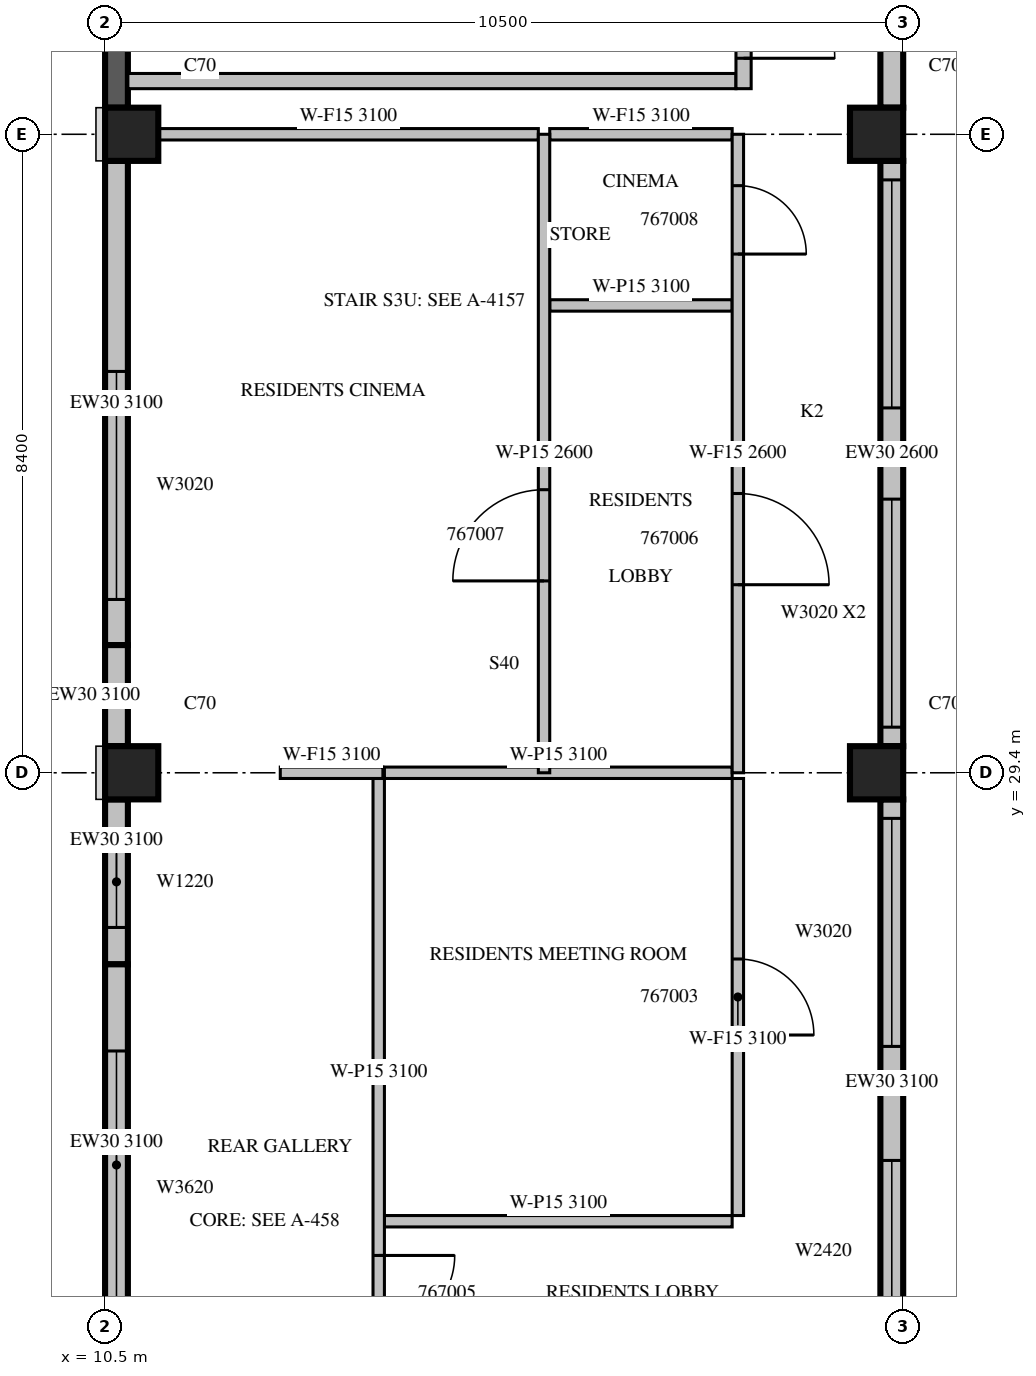
"""IFC4 building model, lengths in metres.
Left out: names, types, materials, properties, quantities, classifications, styles, units other than length and angle.
Written with IfcOpenShell. Run it as: python <this file> out.ifc"""

import sys

from ifc_helpers import new_model, si_unit, direction, frame, frame_2d, origin, origin_2d, place, context, subcontext, project, spatial, rectangle, extrude, source, transform, mapped, element, fill, save


model = new_model("IFC4")
c1 = context("Model", 3, precision=1e-05, world=origin(), true_north=direction((0.0, 1.0)))
c2 = subcontext(c1, "Body", "Model", "MODEL_VIEW")
j1 = project(units=[si_unit("LENGTHUNIT", "METRE"), si_unit("PLANEANGLEUNIT", "RADIAN")], contexts=[c1])
p1 = place(None, origin())
s1 = spatial("IfcSite", under=j1, at=p1, CompositionType="ELEMENT")
p2 = place(p1, origin())
s2 = spatial("IfcBuilding", under=s1, at=p2, CompositionType="ELEMENT")
p3 = place(p2, frame((0.0, 0.0, 295.0)))
s3 = spatial("IfcBuildingStorey", under=s2, at=p3, CompositionType="ELEMENT", Elevation=295.0)
m1 = source(origin(), c2, "Body", "SweptSolid", [
    extrude(rectangle(XDim=0.7, YDim=0.7, at=origin_2d()), origin(), (0.0, 0.0, 1.0), 3.5),
])
for number, where, z_axis, x_axis in (
    (1, (10.85, 29.4, 0.0), (0.0, 0.0, 1.0), (1.0, 0.0, 0.0)),
    (2, (20.65, 29.4, 0.0), (0.0, 0.0, 1.0), (1.0, 0.0, 0.0)),
    (3, (10.85, 37.8, 0.0), (0.0, 0.0, 1.0), (1.0, 0.0, 0.0)),
    (4, (20.65, 37.8, 0.0), (0.0, 0.0, 1.0), (1.0, 0.0, 0.0)),
):
    element("IfcColumn", number, at=place(p3, frame(where, z_axis=z_axis, x_axis=x_axis)), inside=s3, PredefinedType="COLUMN", context=c2, shape_type="MappedRepresentation", body=[
        mapped(m1, transform((0.0, 0.0, 0.0), scale=1.0)),
    ])
m2 = source(origin(), c2, "Body", "SweptSolid", [
    extrude(rectangle(XDim=7.45, YDim=0.3, at=frame_2d((3.725, 0.0))), origin(), (0.0, 0.0, 1.0), 3.1),
])
p4 = place(p3, frame((20.85, 21.6, 0.0), z_axis=(0.0, 0.0, 1.0), x_axis=(0.0, 1.0, 0.0)))
e5 = element("IfcWall", 5, at=p4, inside=s3, PredefinedType="STANDARD", context=c2, shape_type="MappedRepresentation", body=[
    mapped(m2, transform((0.0, 0.0, 0.0), scale=1.0)),
])
m3 = source(origin(), c2, "Body", "SweptSolid", [
    extrude(rectangle(XDim=2.4, YDim=2.0, at=frame_2d((1.2, 1.0))), frame((0.0, 0.16, 0.0), z_axis=(0.0, -1.0, 0.0), x_axis=(1.0, 0.0, 0.0)), (0.0, 0.0, 1.0), 0.32),
])
p5 = place(p4, frame((0.3, 0.0, 0.6)))
e6 = element("IfcOpeningElement", 6, at=p5, cuts=e5, PredefinedType="OPENING", context=c2, shape_type="MappedRepresentation", body=[
    mapped(m3, transform((0.0, 0.0, 0.0), scale=1.0)),
])
m4 = source(origin(), c2, "Body", "SweptSolid", [
    extrude(rectangle(XDim=3.0, YDim=2.0, at=frame_2d((1.5, 1.0))), frame((0.0, 0.16, 0.0), z_axis=(0.0, -1.0, 0.0), x_axis=(1.0, 0.0, 0.0)), (0.0, 0.0, 1.0), 0.32),
])
p6 = place(p4, frame((4.2, 0.0, 0.6)))
e7 = element("IfcOpeningElement", 7, at=p6, cuts=e5, PredefinedType="OPENING", context=c2, shape_type="MappedRepresentation", body=[
    mapped(m4, transform((0.0, 0.0, 0.0), scale=1.0)),
])
m5 = source(origin(), c2, "Body", "SweptSolid", [
    extrude(rectangle(XDim=7.7, YDim=0.3, at=frame_2d((3.85, 0.0))), origin(), (0.0, 0.0, 1.0), 2.6),
])
p7 = place(p3, frame((20.85, 29.75, 0.0), z_axis=(0.0, 0.0, 1.0), x_axis=(0.0, 1.0, 0.0)))
e8 = element("IfcWall", 8, at=p7, inside=s3, PredefinedType="STANDARD", context=c2, shape_type="MappedRepresentation", body=[
    mapped(m5, transform((0.0, 0.0, 0.0), scale=1.0)),
])
p8 = place(p7, frame((0.25, 0.0, 0.6)))
e9 = element("IfcOpeningElement", 9, at=p8, cuts=e8, PredefinedType="OPENING", context=c2, shape_type="MappedRepresentation", body=[
    mapped(m4, transform((0.0, 0.0, 0.0), scale=1.0)),
])
p9 = place(p7, frame((4.45, 0.0, 0.6)))
e10 = element("IfcOpeningElement", 10, at=p9, cuts=e8, PredefinedType="OPENING", context=c2, shape_type="MappedRepresentation", body=[
    mapped(m4, transform((0.0, 0.0, 0.0), scale=1.0)),
])
m6 = source(origin(), c2, "Body", "SweptSolid", [
    extrude(rectangle(XDim=5.53, YDim=0.3, at=frame_2d((2.765, 0.0))), origin(), (0.0, 0.0, 1.0), 3.1),
])
p10 = place(p3, frame((20.85, 38.15, 0.0), z_axis=(0.0, 0.0, 1.0), x_axis=(0.0, 1.0, 0.0)))
e11 = element("IfcWall", 11, at=p10, inside=s3, PredefinedType="STANDARD", context=c2, shape_type="MappedRepresentation", body=[
    mapped(m6, transform((0.0, 0.0, 0.0), scale=1.0)),
])
m7 = source(origin(), c2, "Body", "SweptSolid", [
    extrude(rectangle(XDim=3.6, YDim=2.0, at=frame_2d((1.8, 1.0))), frame((0.0, 0.16, 0.0), z_axis=(0.0, -1.0, 0.0), x_axis=(1.0, 0.0, 0.0)), (0.0, 0.0, 1.0), 0.32),
])
p11 = place(p10, frame((0.79, 0.0, 0.6)))
e12 = element("IfcOpeningElement", 12, at=p11, cuts=e11, PredefinedType="OPENING", context=c2, shape_type="MappedRepresentation", body=[
    mapped(m7, transform((0.0, 0.0, 0.0), scale=1.0)),
])
m8 = source(origin(), c2, "Body", "SweptSolid", [
    extrude(rectangle(XDim=5.53, YDim=0.3, at=frame_2d((2.765, 0.0))), origin(), (0.0, 0.0, 1.0), 3.1),
])
p12 = place(p3, frame((10.65, 43.68, 0.0), z_axis=(0.0, 0.0, 1.0), x_axis=(0.0, -1.0, 0.0)))
e13 = element("IfcWall", 13, at=p12, inside=s3, PredefinedType="SOLIDWALL", context=c2, shape_type="MappedRepresentation", body=[
    mapped(m8, transform((0.0, 0.0, 0.0), scale=1.0)),
])
m9 = source(origin(), c2, "Body", "SweptSolid", [
    extrude(rectangle(XDim=6.37, YDim=0.3, at=frame_2d((3.185, 0.0))), origin(), (0.0, 0.0, 1.0), 3.1),
])
p13 = place(p3, frame((10.65, 37.45, 0.0), z_axis=(0.0, 0.0, 1.0), x_axis=(0.0, -1.0, 0.0)))
e14 = element("IfcWall", 14, at=p13, inside=s3, PredefinedType="STANDARD", context=c2, shape_type="MappedRepresentation", body=[
    mapped(m9, transform((0.0, 0.0, 0.0), scale=1.0)),
])
p14 = place(p13, frame((2.77, 0.0, 0.6)))
e15 = element("IfcOpeningElement", 15, at=p14, cuts=e14, PredefinedType="OPENING", context=c2, shape_type="MappedRepresentation", body=[
    mapped(m4, transform((0.0, 0.0, 0.0), scale=1.0)),
])
m10 = source(origin(), c2, "Body", "SweptSolid", [
    extrude(rectangle(XDim=1.33, YDim=0.3, at=frame_2d((0.665, 0.0))), origin(), (0.0, 0.0, 1.0), 3.1),
])
p15 = place(p3, frame((10.65, 31.08, 0.0), z_axis=(0.0, 0.0, 1.0), x_axis=(0.0, -1.0, 0.0)))
e16 = element("IfcWall", 16, at=p15, inside=s3, PredefinedType="STANDARD", context=c2, shape_type="MappedRepresentation", body=[
    mapped(m10, transform((0.0, 0.0, 0.0), scale=1.0)),
])
m11 = source(origin(), c2, "Body", "SweptSolid", [
    extrude(rectangle(XDim=2.17, YDim=0.3, at=frame_2d((1.085, 0.0))), origin(), (0.0, 0.0, 1.0), 3.1),
])
p16 = place(p3, frame((10.65, 29.05, 0.0), z_axis=(0.0, 0.0, 1.0), x_axis=(0.0, -1.0, 0.0)))
e17 = element("IfcWall", 17, at=p16, inside=s3, PredefinedType="STANDARD", context=c2, shape_type="MappedRepresentation", body=[
    mapped(m11, transform((0.0, 0.0, 0.0), scale=1.0)),
])
m12 = source(origin(), c2, "Body", "SweptSolid", [
    extrude(rectangle(XDim=1.2, YDim=2.0, at=frame_2d((0.6, 1.0))), frame((0.0, 0.16, 0.0), z_axis=(0.0, -1.0, 0.0), x_axis=(1.0, 0.0, 0.0)), (0.0, 0.0, 1.0), 0.32),
])
p17 = place(p16, frame((0.485, 0.0, 0.6)))
e18 = element("IfcOpeningElement", 18, at=p17, cuts=e17, PredefinedType="OPENING", context=c2, shape_type="MappedRepresentation", body=[
    mapped(m12, transform((0.0, 0.0, 0.0), scale=1.0)),
])
m13 = source(origin(), c2, "Body", "SweptSolid", [
    extrude(rectangle(XDim=5.28, YDim=0.3, at=frame_2d((2.64, 0.0))), origin(), (0.0, 0.0, 1.0), 3.1),
])
p18 = place(p3, frame((10.65, 26.88, 0.0), z_axis=(0.0, 0.0, 1.0), x_axis=(0.0, -1.0, 0.0)))
e19 = element("IfcWall", 19, at=p18, inside=s3, PredefinedType="STANDARD", context=c2, shape_type="MappedRepresentation", body=[
    mapped(m13, transform((0.0, 0.0, 0.0), scale=1.0)),
])
p19 = place(p18, frame((1.14, 0.0, 0.6)))
e20 = element("IfcOpeningElement", 20, at=p19, cuts=e19, PredefinedType="OPENING", context=c2, shape_type="MappedRepresentation", body=[
    mapped(m7, transform((0.0, 0.0, 0.0), scale=1.0)),
])
m14 = source(origin(), c2, "Body", "SweptSolid", [
    extrude(rectangle(XDim=8.0, YDim=0.2, at=frame_2d((4.0, 0.0))), origin(), (0.0, 0.0, 1.0), 3.1),
])
p20 = place(p3, frame((10.8, 38.5, 0.0), z_axis=(0.0, 0.0, 1.0), x_axis=(1.0, 0.0, 0.0)))
e21 = element("IfcWall", 21, at=p20, inside=s3, PredefinedType="PARTITIONING", context=c2, shape_type="MappedRepresentation", body=[
    mapped(m14, transform((0.0, 0.0, 0.0), scale=1.0)),
])
m15 = source(origin(), c2, "Body", "SweptSolid", [
    extrude(rectangle(XDim=5.45, YDim=0.2, at=frame_2d((2.725, 0.0))), origin(), (0.0, 0.0, 1.0), 3.1),
])
p21 = place(p3, frame((18.9, 38.4, 0.0), z_axis=(0.0, 0.0, 1.0), x_axis=(0.0, 1.0, 0.0)))
e22 = element("IfcWall", 22, at=p21, inside=s3, PredefinedType="PARTITIONING", context=c2, shape_type="MappedRepresentation", body=[
    mapped(m15, transform((0.0, 0.0, 0.0), scale=1.0)),
])
m16 = source(origin(), c2, "Body", "SweptSolid", [
    extrude(rectangle(XDim=1.2, YDim=2.1, at=frame_2d((0.6, 1.05))), frame((0.0, 0.11, 0.0), z_axis=(0.0, -1.0, 0.0), x_axis=(1.0, 0.0, 0.0)), (0.0, 0.0, 1.0), 0.22),
])
p22 = place(p21, frame((0.4, 0.0, 0.0)))
e23 = element("IfcOpeningElement", 23, at=p22, cuts=e22, PredefinedType="OPENING", context=c2, shape_type="MappedRepresentation", body=[
    mapped(m16, transform((0.0, 0.0, 0.0), scale=1.0)),
])
m17 = source(origin(), c2, "Body", "SweptSolid", [
    extrude(rectangle(XDim=0.9, YDim=2.1, at=frame_2d((0.45, 1.05))), frame((0.0, 0.11, 0.0), z_axis=(0.0, -1.0, 0.0), x_axis=(1.0, 0.0, 0.0)), (0.0, 0.0, 1.0), 0.22),
])
p23 = place(p21, frame((3.25, 0.0, 0.0)))
e24 = element("IfcOpeningElement", 24, at=p23, cuts=e22, PredefinedType="OPENING", context=c2, shape_type="MappedRepresentation", body=[
    mapped(m17, transform((0.0, 0.0, 0.0), scale=1.0)),
])
m18 = source(origin(), c2, "Body", "SweptSolid", [
    extrude(rectangle(XDim=4.575, YDim=0.15, at=frame_2d((2.288, 0.0))), origin(), (0.0, 0.0, 1.0), 3.1),
])
for number, where, z_axis, x_axis in (
    (25, (14.175, 23.5, 0.0), (0.0, 0.0, 1.0), (1.0, 0.0, 0.0)),
    (26, (18.75, 29.4, 0.0), (0.0, 0.0, 1.0), (-1.0, 0.0, 0.0)),
):
    element("IfcWall", number, at=place(p3, frame(where, z_axis=z_axis, x_axis=x_axis)), inside=s3, PredefinedType="PARTITIONING", context=c2, shape_type="MappedRepresentation", body=[
        mapped(m18, transform((0.0, 0.0, 0.0), scale=1.0)),
    ])
m19 = source(origin(), c2, "Body", "SweptSolid", [
    extrude(rectangle(XDim=5.75, YDim=0.15, at=frame_2d((2.875, 0.0))), origin(), (0.0, 0.0, 1.0), 3.1),
])
p24 = place(p3, frame((18.825, 23.575, 0.0), z_axis=(0.0, 0.0, 1.0), x_axis=(0.0, 1.0, 0.0)))
e27 = element("IfcWall", 27, at=p24, inside=s3, PredefinedType="PARTITIONING", context=c2, shape_type="MappedRepresentation", body=[
    mapped(m19, transform((0.0, 0.0, 0.0), scale=1.0)),
])
m20 = source(origin(), c2, "Body", "SweptSolid", [
    extrude(rectangle(XDim=1.0, YDim=2.1, at=frame_2d((0.5, 1.05))), frame((0.0, 0.085, 0.0), z_axis=(0.0, -1.0, 0.0), x_axis=(1.0, 0.0, 0.0)), (0.0, 0.0, 1.0), 0.17),
])
p25 = place(p24, frame((2.375, 0.0, 0.0)))
e28 = element("IfcOpeningElement", 28, at=p25, cuts=e27, PredefinedType="OPENING", context=c2, shape_type="MappedRepresentation", body=[
    mapped(m20, transform((0.0, 0.0, 0.0), scale=1.0)),
])
m21 = source(origin(), c2, "Body", "SweptSolid", [
    extrude(rectangle(XDim=7.725, YDim=0.15, at=frame_2d((3.862, 0.0))), origin(), (0.0, 0.0, 1.0), 3.1),
])
p26 = place(p3, frame((14.1, 29.325, 0.0), z_axis=(0.0, 0.0, 1.0), x_axis=(0.0, -1.0, 0.0)))
e29 = element("IfcWall", 29, at=p26, inside=s3, PredefinedType="PARTITIONING", context=c2, shape_type="MappedRepresentation", body=[
    mapped(m21, transform((0.0, 0.0, 0.0), scale=1.0)),
])
p27 = place(p26, frame((6.275, 0.0, 0.0)))
e30 = element("IfcOpeningElement", 30, at=p27, cuts=e29, PredefinedType="OPENING", context=c2, shape_type="MappedRepresentation", body=[
    mapped(m20, transform((0.0, 0.0, 0.0), scale=1.0)),
])
p28 = place(p3, frame((18.75, 35.548, 0.0), z_axis=(0.0, 0.0, 1.0), x_axis=(-1.0, 0.0, 0.0)))
e31 = element("IfcWall", 31, at=p28, inside=s3, PredefinedType="PARTITIONING", context=c2, shape_type="SweptSolid", body=[
    extrude(rectangle(XDim=2.4, YDim=0.15, at=frame_2d((1.2, 0.0))), origin(), (0.0, 0.0, 1.0), 3.1),
])
m22 = source(origin(), c2, "Body", "SweptSolid", [
    extrude(rectangle(XDim=1.35, YDim=0.15, at=frame_2d((0.675, 0.0))), origin(), (0.0, 0.0, 1.0), 3.1),
])
p29 = place(p3, frame((14.155, 29.4, 0.0), z_axis=(0.0, 0.0, 1.0), x_axis=(-1.0, 0.0, 0.0)))
e32 = element("IfcWall", 32, at=p29, inside=s3, PredefinedType="PARTITIONING", context=c2, shape_type="MappedRepresentation", body=[
    mapped(m22, transform((0.0, 0.0, 0.0), scale=1.0)),
])
m23 = source(origin(), c2, "Body", "SweptSolid", [
    extrude(rectangle(XDim=5.001, YDim=0.15, at=frame_2d((2.501, 0.0))), origin(), (0.0, 0.0, 1.0), 3.1),
])
p30 = place(p3, frame((16.2, 37.8, 0.0), z_axis=(0.0, 0.0, 1.0), x_axis=(-1.0, 0.0, 0.0)))
e33 = element("IfcWall", 33, at=p30, inside=s3, PredefinedType="PARTITIONING", context=c2, shape_type="MappedRepresentation", body=[
    mapped(m23, transform((0.0, 0.0, 0.0), scale=1.0)),
])
m24 = source(origin(), c2, "Body", "SweptSolid", [
    extrude(rectangle(XDim=2.4, YDim=0.15, at=frame_2d((1.2, 0.0))), origin(), (0.0, 0.0, 1.0), 3.1),
])
p31 = place(p3, frame((18.75, 37.8, 0.0), z_axis=(0.0, 0.0, 1.0), x_axis=(-1.0, 0.0, 0.0)))
e34 = element("IfcWall", 34, at=p31, inside=s3, PredefinedType="PARTITIONING", context=c2, shape_type="MappedRepresentation", body=[
    mapped(m24, transform((0.0, 0.0, 0.0), scale=1.0)),
])
m25 = source(origin(), c2, "Body", "SweptSolid", [
    extrude(rectangle(XDim=8.4, YDim=0.15, at=frame_2d((4.2, 0.0))), origin(), (0.0, 0.0, 1.0), 2.6),
])
p32 = place(p3, frame((16.275, 29.4, 0.0), z_axis=(0.0, 0.0, 1.0), x_axis=(0.0, 1.0, 0.0)))
e35 = element("IfcWall", 35, at=p32, inside=s3, PredefinedType="PARTITIONING", context=c2, shape_type="MappedRepresentation", body=[
    mapped(m25, transform((0.0, 0.0, 0.0), scale=1.0)),
])
m26 = source(origin(), c2, "Body", "SweptSolid", [
    extrude(rectangle(XDim=1.2, YDim=2.1, at=frame_2d((0.6, 1.05))), frame((0.0, 0.085, 0.0), z_axis=(0.0, -1.0, 0.0), x_axis=(1.0, 0.0, 0.0)), (0.0, 0.0, 1.0), 0.17),
])
p33 = place(p32, frame((2.524, 0.0, 0.0)))
e36 = element("IfcOpeningElement", 36, at=p33, cuts=e35, PredefinedType="OPENING", context=c2, shape_type="MappedRepresentation", body=[
    mapped(m26, transform((0.0, 0.0, 0.0), scale=1.0)),
])
p34 = place(p3, frame((18.825, 29.4, 0.0), z_axis=(0.0, 0.0, 1.0), x_axis=(0.0, 1.0, 0.0)))
e37 = element("IfcWall", 37, at=p34, inside=s3, PredefinedType="PARTITIONING", context=c2, shape_type="MappedRepresentation", body=[
    mapped(m25, transform((0.0, 0.0, 0.0), scale=1.0)),
])
p35 = place(p34, frame((2.474, 0.0, 0.0)))
e38 = element("IfcOpeningElement", 38, at=p35, cuts=e37, PredefinedType="OPENING", context=c2, shape_type="MappedRepresentation", body=[
    mapped(m26, transform((0.0, 0.0, 0.0), scale=1.0)),
])
m27 = source(origin(), c2, "Body", "SweptSolid", [
    extrude(rectangle(XDim=0.9, YDim=2.1, at=frame_2d((0.45, 1.05))), frame((0.0, 0.085, 0.0), z_axis=(0.0, -1.0, 0.0), x_axis=(1.0, 0.0, 0.0)), (0.0, 0.0, 1.0), 0.17),
])
p36 = place(p34, frame((6.824, 0.0, 0.0)))
e39 = element("IfcOpeningElement", 39, at=p36, cuts=e37, PredefinedType="OPENING", context=c2, shape_type="MappedRepresentation", body=[
    mapped(m27, transform((0.0, 0.0, 0.0), scale=1.0)),
])
m28 = source(origin(), c2, "Body", "SweptSolid", [
    extrude(rectangle(XDim=2.4, YDim=2.0, at=frame_2d((1.2, 1.0))), frame((0.0, 0.03, 0.0), z_axis=(0.0, -1.0, 0.0), x_axis=(1.0, 0.0, 0.0)), (0.0, 0.0, 1.0), 0.06),
])
p37 = place(p5, origin())
e40 = element("IfcWindow", 40, at=p37, inside=s3, PartitioningType="SINGLE_PANEL", PredefinedType="WINDOW", context=c2, shape_type="MappedRepresentation", body=[
    mapped(m28, transform((0.0, 0.0, 0.0), scale=1.0)),
])
fill(e6, e40)
m29 = source(origin(), c2, "Body", "SweptSolid", [
    extrude(rectangle(XDim=3.0, YDim=2.0, at=frame_2d((1.5, 1.0))), frame((0.0, 0.03, 0.0), z_axis=(0.0, -1.0, 0.0), x_axis=(1.0, 0.0, 0.0)), (0.0, 0.0, 1.0), 0.06),
])
p38 = place(p6, origin())
e41 = element("IfcWindow", 41, at=p38, inside=s3, PartitioningType="SINGLE_PANEL", PredefinedType="WINDOW", context=c2, shape_type="MappedRepresentation", body=[
    mapped(m29, transform((0.0, 0.0, 0.0), scale=1.0)),
])
fill(e7, e41)
p39 = place(p8, origin())
e42 = element("IfcWindow", 42, at=p39, inside=s3, PartitioningType="SINGLE_PANEL", PredefinedType="WINDOW", context=c2, shape_type="MappedRepresentation", body=[
    mapped(m29, transform((0.0, 0.0, 0.0), scale=1.0)),
])
fill(e9, e42)
p40 = place(p9, origin())
e43 = element("IfcWindow", 43, at=p40, inside=s3, PartitioningType="SINGLE_PANEL", PredefinedType="WINDOW", context=c2, shape_type="MappedRepresentation", body=[
    mapped(m29, transform((0.0, 0.0, 0.0), scale=1.0)),
])
fill(e10, e43)
p41 = place(p14, origin())
e44 = element("IfcWindow", 44, at=p41, inside=s3, PartitioningType="SINGLE_PANEL", PredefinedType="WINDOW", context=c2, shape_type="MappedRepresentation", body=[
    mapped(m29, transform((0.0, 0.0, 0.0), scale=1.0)),
])
fill(e15, e44)
m30 = source(origin(), c2, "Body", "SweptSolid", [
    extrude(rectangle(XDim=1.2, YDim=2.0, at=frame_2d((0.6, 1.0))), frame((0.0, 0.03, 0.0), z_axis=(0.0, -1.0, 0.0), x_axis=(1.0, 0.0, 0.0)), (0.0, 0.0, 1.0), 0.06),
])
p42 = place(p17, origin())
e45 = element("IfcWindow", 45, at=p42, inside=s3, PartitioningType="SINGLE_PANEL", PredefinedType="WINDOW", context=c2, shape_type="MappedRepresentation", body=[
    mapped(m30, transform((0.0, 0.0, 0.0), scale=1.0)),
])
fill(e18, e45)
m31 = source(origin(), c2, "Body", "SweptSolid", [
    extrude(rectangle(XDim=3.6, YDim=2.0, at=frame_2d((1.8, 1.0))), frame((0.0, 0.03, 0.0), z_axis=(0.0, -1.0, 0.0), x_axis=(1.0, 0.0, 0.0)), (0.0, 0.0, 1.0), 0.06),
])
p43 = place(p19, origin())
e46 = element("IfcWindow", 46, at=p43, inside=s3, PartitioningType="SINGLE_PANEL", PredefinedType="WINDOW", context=c2, shape_type="MappedRepresentation", body=[
    mapped(m31, transform((0.0, 0.0, 0.0), scale=1.0)),
])
fill(e20, e46)
m32 = source(origin(), c2, "Body", "SweptSolid", [
    extrude(rectangle(XDim=1.2, YDim=2.1, at=frame_2d((0.6, 1.05))), frame((0.0, 0.025, 0.0), z_axis=(0.0, -1.0, 0.0), x_axis=(1.0, 0.0, 0.0)), (0.0, 0.0, 1.0), 0.05),
])
p44 = place(p22, origin())
e47 = element("IfcDoor", 47, at=p44, inside=s3, OperationType="SINGLE_SWING_RIGHT", PredefinedType="DOOR", context=c2, shape_type="MappedRepresentation", body=[
    mapped(m32, transform((0.0, 0.0, 0.0), scale=1.0)),
])
fill(e23, e47)
m33 = source(origin(), c2, "Body", "SweptSolid", [
    extrude(rectangle(XDim=1.0, YDim=2.1, at=frame_2d((0.5, 1.05))), frame((0.0, 0.025, 0.0), z_axis=(0.0, -1.0, 0.0), x_axis=(1.0, 0.0, 0.0)), (0.0, 0.0, 1.0), 0.05),
])
p45 = place(p25, origin())
e48 = element("IfcDoor", 48, at=p45, inside=s3, OperationType="SINGLE_SWING_RIGHT", PredefinedType="DOOR", context=c2, shape_type="MappedRepresentation", body=[
    mapped(m33, transform((0.0, 0.0, 0.0), scale=1.0)),
])
fill(e28, e48)
p46 = place(p27, origin())
e49 = element("IfcDoor", 49, at=p46, inside=s3, OperationType="SINGLE_SWING_LEFT", PredefinedType="DOOR", context=c2, shape_type="MappedRepresentation", body=[
    mapped(m33, transform((0.0, 0.0, 0.0), scale=1.0)),
])
fill(e30, e49)
p47 = place(p35, origin())
e50 = element("IfcDoor", 50, at=p47, inside=s3, OperationType="SINGLE_SWING_RIGHT", PredefinedType="DOOR", context=c2, shape_type="MappedRepresentation", body=[
    mapped(m32, transform((0.0, 0.0, 0.0), scale=1.0)),
])
fill(e38, e50)
p48 = place(p33, origin())
e51 = element("IfcDoor", 51, at=p48, inside=s3, OperationType="SINGLE_SWING_LEFT", PredefinedType="DOOR", context=c2, shape_type="MappedRepresentation", body=[
    mapped(m32, transform((0.0, 0.0, 0.0), scale=1.0)),
])
fill(e36, e51)
m34 = source(origin(), c2, "Body", "SweptSolid", [
    extrude(rectangle(XDim=0.9, YDim=2.1, at=frame_2d((0.45, 1.05))), frame((0.0, 0.025, 0.0), z_axis=(0.0, -1.0, 0.0), x_axis=(1.0, 0.0, 0.0)), (0.0, 0.0, 1.0), 0.05),
])
p49 = place(p36, origin())
e52 = element("IfcDoor", 52, at=p49, inside=s3, OperationType="SINGLE_SWING_RIGHT", PredefinedType="DOOR", context=c2, shape_type="MappedRepresentation", body=[
    mapped(m34, transform((0.0, 0.0, 0.0), scale=1.0)),
])
fill(e39, e52)
save(model, sys.argv[1])
